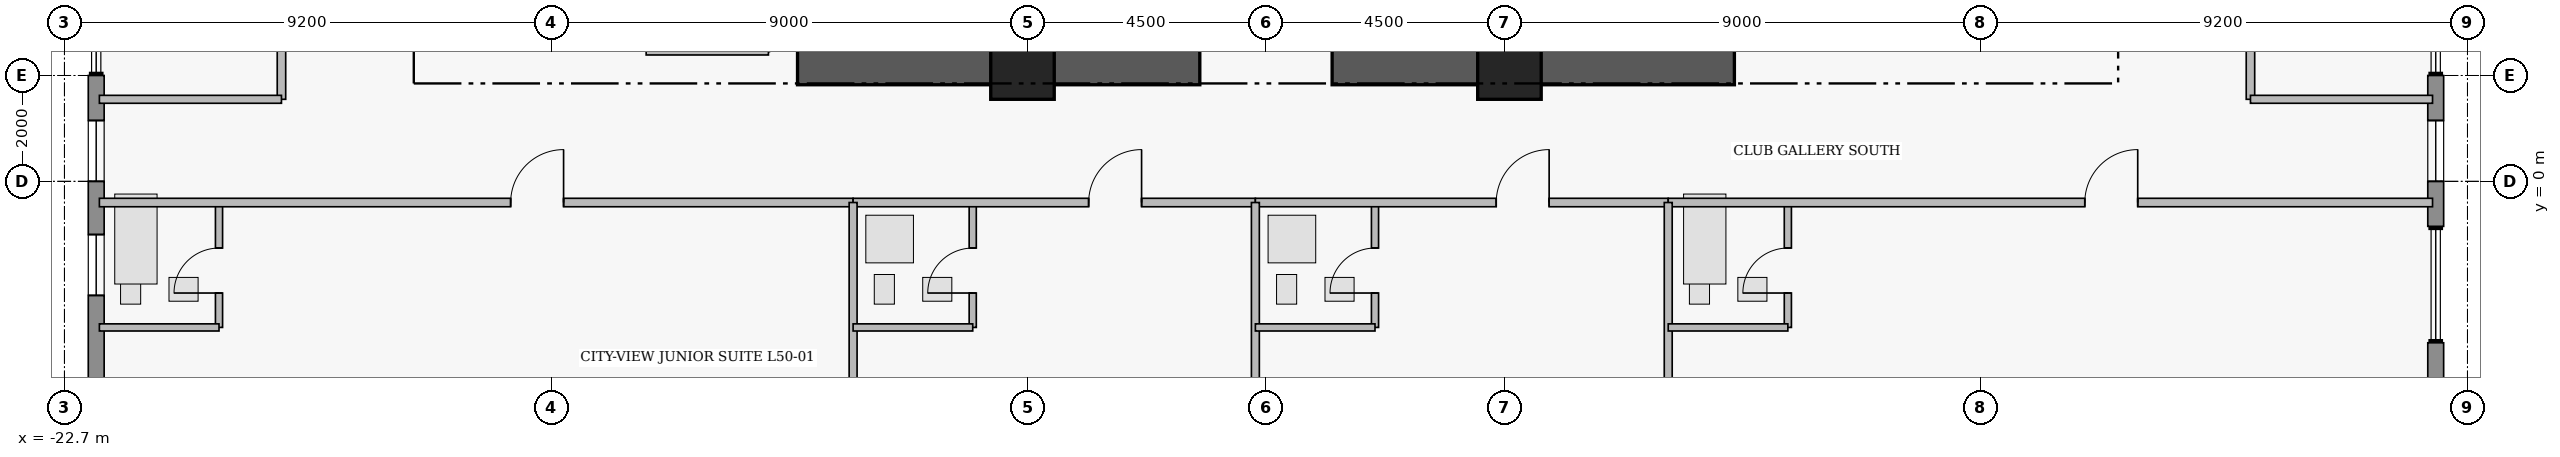
"""IFC4 building model, lengths in metres.
Left out: names, types, materials, properties, quantities, classifications, styles, units other than length and angle.
Written with IfcOpenShell. Run it as: python <this file> out.ifc"""

import sys

from ifc_helpers import new_model, si_unit, direction, frame, frame_2d, origin, origin_2d, place, context, subcontext, project, spatial, rectangle, extrude, element, fill, save


model = new_model("IFC4")
c1 = context("Model", 3, precision=1e-05, world=origin(), true_north=direction((0.0, 1.0)))
c2 = subcontext(c1, "Body", "Model", "MODEL_VIEW")
j1 = project(units=[si_unit("LENGTHUNIT", "METRE"), si_unit("PLANEANGLEUNIT", "RADIAN")], contexts=[c1])
p1 = place(None, origin())
s1 = spatial("IfcSite", under=j1, at=p1, CompositionType="ELEMENT")
p2 = place(p1, origin())
s2 = spatial("IfcBuilding", under=s1, at=p2, CompositionType="ELEMENT")
p3 = place(p2, frame((0.0, 0.0, 199.9)))
s3 = spatial("IfcBuildingStorey", under=s2, at=p3, CompositionType="ELEMENT", Elevation=199.9)
for number, where, z_axis, x_axis in (
    (1, (-8.85, 2.15, 0.0), (0.0, 0.0, 1.0), (1.0, 0.0, 0.0)),
    (2, (1.25, 2.15, 0.0), (0.0, 0.0, 1.0), (1.0, 0.0, 0.0)),
):
    element("IfcWall", number, at=place(p3, frame(where, z_axis=z_axis, x_axis=x_axis)), inside=s3, PredefinedType="SHEAR", context=c2, shape_type="SweptSolid", body=[
        extrude(rectangle(XDim=7.6, YDim=0.65, at=frame_2d((3.8, 0.0))), origin(), (0.0, 0.0, 1.0), 3.53),
    ])
for number, where, z_axis, x_axis in (
    (3, (-4.6, 2.15, 0.0), (0.0, 0.0, 1.0), (1.0, 0.0, 0.0)),
    (4, (4.6, 2.15, 0.0), (0.0, 0.0, 1.0), (1.0, 0.0, 0.0)),
):
    element("IfcColumn", number, at=place(p3, frame(where, z_axis=z_axis, x_axis=x_axis)), inside=s3, PredefinedType="COLUMN", context=c2, shape_type="SweptSolid", body=[
        extrude(rectangle(XDim=1.2, YDim=1.2, at=origin_2d()), origin(), (0.0, 0.0, 1.0), 3.75),
    ])
p4 = place(p3, frame((-22.1, -4.2, 0.0), z_axis=(0.0, 0.0, 1.0), x_axis=(0.0, 1.0, 0.0)))
e5 = element("IfcWall", 5, at=p4, inside=s3, PredefinedType="STANDARD", context=c2, shape_type="SweptSolid", body=[
    extrude(rectangle(XDim=6.2, YDim=0.3, at=frame_2d((3.1, 0.0))), origin(), (0.0, 0.0, 1.0), 3.53),
])
p5 = place(p4, frame((2.045, 0.0, 0.95)))
e6 = element("IfcOpeningElement", 6, at=p5, cuts=e5, PredefinedType="OPENING", context=c2, shape_type="SweptSolid", body=[
    extrude(rectangle(XDim=1.15, YDim=1.55, at=frame_2d((0.575, 0.775))), frame((0.0, 0.16, 0.0), z_axis=(0.0, -1.0, 0.0), x_axis=(1.0, 0.0, 0.0)), (0.0, 0.0, 1.0), 0.32),
])
p6 = place(p4, frame((4.2, 0.0, 0.95)))
e7 = element("IfcOpeningElement", 7, at=p6, cuts=e5, PredefinedType="OPENING", context=c2, shape_type="SweptSolid", body=[
    extrude(rectangle(XDim=1.15, YDim=1.55, at=frame_2d((0.575, 0.775))), frame((0.0, 0.16, 0.0), z_axis=(0.0, -1.0, 0.0), x_axis=(1.0, 0.0, 0.0)), (0.0, 0.0, 1.0), 0.32),
])
p7 = place(p3, frame((22.1, 2.0, 0.0), z_axis=(0.0, 0.0, 1.0), x_axis=(0.0, -1.0, 0.0)))
e8 = element("IfcWall", 8, at=p7, inside=s3, PredefinedType="STANDARD", context=c2, shape_type="SweptSolid", body=[
    extrude(rectangle(XDim=2.85, YDim=0.3, at=frame_2d((1.425, 0.0))), origin(), (0.0, 0.0, 1.0), 3.53),
])
p8 = place(p7, frame((0.85, 0.0, 0.95)))
e9 = element("IfcOpeningElement", 9, at=p8, cuts=e8, PredefinedType="OPENING", context=c2, shape_type="SweptSolid", body=[
    extrude(rectangle(XDim=1.15, YDim=1.55, at=frame_2d((0.575, 0.775))), frame((0.0, 0.16, 0.0), z_axis=(0.0, -1.0, 0.0), x_axis=(1.0, 0.0, 0.0)), (0.0, 0.0, 1.0), 0.32),
])
p9 = place(p3, frame((22.1, -3.05, 0.0), z_axis=(0.0, 0.0, 1.0), x_axis=(0.0, -1.0, 0.0)))
e10 = element("IfcWall", 10, at=p9, inside=s3, PredefinedType="STANDARD", context=c2, shape_type="SweptSolid", body=[
    extrude(rectangle(XDim=1.15, YDim=0.3, at=frame_2d((0.575, 0.0))), origin(), (0.0, 0.0, 1.0), 3.53),
])
p10 = place(p3, frame((-19.78, -2.76, 0.0), z_axis=(0.0, 0.0, 1.0), x_axis=(0.0, 1.0, 0.0)))
e11 = element("IfcWall", 11, at=p10, inside=s3, PredefinedType="PLUMBINGWALL", context=c2, shape_type="SweptSolid", body=[
    extrude(rectangle(XDim=2.36, YDim=0.135, at=frame_2d((1.18, 0.0))), origin(), (0.0, 0.0, 1.0), 3.53),
])
p11 = place(p10, frame((0.65, 0.0, 0.0)))
e12 = element("IfcOpeningElement", 12, at=p11, cuts=e11, PredefinedType="OPENING", context=c2, shape_type="SweptSolid", body=[
    extrude(rectangle(XDim=0.85, YDim=2.1, at=frame_2d((0.425, 1.05))), frame((0.0, 0.077, 0.0), z_axis=(0.0, -1.0, 0.0), x_axis=(1.0, 0.0, 0.0)), (0.0, 0.0, 1.0), 0.155),
])
p12 = place(p3, frame((-22.04, -0.4, 0.0), z_axis=(0.0, 0.0, 1.0), x_axis=(1.0, 0.0, 0.0)))
e13 = element("IfcWall", 13, at=p12, inside=s3, PredefinedType="PARTITIONING", context=c2, shape_type="SweptSolid", body=[
    extrude(rectangle(XDim=14.24, YDim=0.16, at=frame_2d((7.12, 0.0))), origin(), (0.0, 0.0, 1.0), 3.53),
])
p13 = place(p12, frame((7.77, 0.0, 0.0)))
e14 = element("IfcOpeningElement", 14, at=p13, cuts=e13, PredefinedType="OPENING", context=c2, shape_type="SweptSolid", body=[
    extrude(rectangle(XDim=1.0, YDim=2.15, at=frame_2d((0.5, 1.075))), frame((0.0, 0.09, 0.0), z_axis=(0.0, -1.0, 0.0), x_axis=(1.0, 0.0, 0.0)), (0.0, 0.0, 1.0), 0.18),
])
p14 = place(p3, frame((-5.54, -2.76, 0.0), z_axis=(0.0, 0.0, 1.0), x_axis=(0.0, 1.0, 0.0)))
e15 = element("IfcWall", 15, at=p14, inside=s3, PredefinedType="PLUMBINGWALL", context=c2, shape_type="SweptSolid", body=[
    extrude(rectangle(XDim=2.36, YDim=0.135, at=frame_2d((1.18, 0.0))), origin(), (0.0, 0.0, 1.0), 3.53),
])
p15 = place(p14, frame((0.65, 0.0, 0.0)))
e16 = element("IfcOpeningElement", 16, at=p15, cuts=e15, PredefinedType="OPENING", context=c2, shape_type="SweptSolid", body=[
    extrude(rectangle(XDim=0.85, YDim=2.1, at=frame_2d((0.425, 1.05))), frame((0.0, 0.077, 0.0), z_axis=(0.0, -1.0, 0.0), x_axis=(1.0, 0.0, 0.0)), (0.0, 0.0, 1.0), 0.155),
])
p16 = place(p3, frame((-7.8, -0.4, 0.0), z_axis=(0.0, 0.0, 1.0), x_axis=(1.0, 0.0, 0.0)))
e17 = element("IfcWall", 17, at=p16, inside=s3, PredefinedType="PARTITIONING", context=c2, shape_type="SweptSolid", body=[
    extrude(rectangle(XDim=7.6, YDim=0.16, at=frame_2d((3.8, 0.0))), origin(), (0.0, 0.0, 1.0), 3.53),
])
p17 = place(p16, frame((4.45, 0.0, 0.0)))
e18 = element("IfcOpeningElement", 18, at=p17, cuts=e17, PredefinedType="OPENING", context=c2, shape_type="SweptSolid", body=[
    extrude(rectangle(XDim=1.0, YDim=2.15, at=frame_2d((0.5, 1.075))), frame((0.0, 0.09, 0.0), z_axis=(0.0, -1.0, 0.0), x_axis=(1.0, 0.0, 0.0)), (0.0, 0.0, 1.0), 0.18),
])
p18 = place(p3, frame((2.06, -2.76, 0.0), z_axis=(0.0, 0.0, 1.0), x_axis=(0.0, 1.0, 0.0)))
e19 = element("IfcWall", 19, at=p18, inside=s3, PredefinedType="PLUMBINGWALL", context=c2, shape_type="SweptSolid", body=[
    extrude(rectangle(XDim=2.36, YDim=0.135, at=frame_2d((1.18, 0.0))), origin(), (0.0, 0.0, 1.0), 3.53),
])
p19 = place(p18, frame((0.65, 0.0, 0.0)))
e20 = element("IfcOpeningElement", 20, at=p19, cuts=e19, PredefinedType="OPENING", context=c2, shape_type="SweptSolid", body=[
    extrude(rectangle(XDim=0.85, YDim=2.1, at=frame_2d((0.425, 1.05))), frame((0.0, 0.077, 0.0), z_axis=(0.0, -1.0, 0.0), x_axis=(1.0, 0.0, 0.0)), (0.0, 0.0, 1.0), 0.155),
])
p20 = place(p3, frame((-0.2, -0.4, 0.0), z_axis=(0.0, 0.0, 1.0), x_axis=(1.0, 0.0, 0.0)))
e21 = element("IfcWall", 21, at=p20, inside=s3, PredefinedType="PARTITIONING", context=c2, shape_type="SweptSolid", body=[
    extrude(rectangle(XDim=7.8, YDim=0.16, at=frame_2d((3.9, 0.0))), origin(), (0.0, 0.0, 1.0), 3.53),
])
p21 = place(p20, frame((4.55, 0.0, 0.0)))
e22 = element("IfcOpeningElement", 22, at=p21, cuts=e21, PredefinedType="OPENING", context=c2, shape_type="SweptSolid", body=[
    extrude(rectangle(XDim=1.0, YDim=2.15, at=frame_2d((0.5, 1.075))), frame((0.0, 0.09, 0.0), z_axis=(0.0, -1.0, 0.0), x_axis=(1.0, 0.0, 0.0)), (0.0, 0.0, 1.0), 0.18),
])
p22 = place(p3, frame((9.86, -2.76, 0.0), z_axis=(0.0, 0.0, 1.0), x_axis=(0.0, 1.0, 0.0)))
e23 = element("IfcWall", 23, at=p22, inside=s3, PredefinedType="PLUMBINGWALL", context=c2, shape_type="SweptSolid", body=[
    extrude(rectangle(XDim=2.36, YDim=0.135, at=frame_2d((1.18, 0.0))), origin(), (0.0, 0.0, 1.0), 3.53),
])
p23 = place(p22, frame((0.65, 0.0, 0.0)))
e24 = element("IfcOpeningElement", 24, at=p23, cuts=e23, PredefinedType="OPENING", context=c2, shape_type="SweptSolid", body=[
    extrude(rectangle(XDim=0.85, YDim=2.1, at=frame_2d((0.425, 1.05))), frame((0.0, 0.077, 0.0), z_axis=(0.0, -1.0, 0.0), x_axis=(1.0, 0.0, 0.0)), (0.0, 0.0, 1.0), 0.155),
])
p24 = place(p3, frame((7.6, -0.4, 0.0), z_axis=(0.0, 0.0, 1.0), x_axis=(1.0, 0.0, 0.0)))
e25 = element("IfcWall", 25, at=p24, inside=s3, PredefinedType="PARTITIONING", context=c2, shape_type="SweptSolid", body=[
    extrude(rectangle(XDim=14.44, YDim=0.16, at=frame_2d((7.22, 0.0))), origin(), (0.0, 0.0, 1.0), 3.53),
])
p25 = place(p24, frame((7.87, 0.0, 0.0)))
e26 = element("IfcOpeningElement", 26, at=p25, cuts=e25, PredefinedType="OPENING", context=c2, shape_type="SweptSolid", body=[
    extrude(rectangle(XDim=1.0, YDim=2.15, at=frame_2d((0.5, 1.075))), frame((0.0, 0.09, 0.0), z_axis=(0.0, -1.0, 0.0), x_axis=(1.0, 0.0, 0.0)), (0.0, 0.0, 1.0), 0.18),
])
p26 = place(p3, frame((18.6, 1.55, 0.0), z_axis=(0.0, 0.0, 1.0), x_axis=(0.0, 1.0, 0.0)))
e27 = element("IfcWall", 27, at=p26, inside=s3, PredefinedType="PARTITIONING", context=c2, shape_type="SweptSolid", body=[
    extrude(rectangle(XDim=5.2, YDim=0.16, at=frame_2d((2.6, 0.0))), origin(), (0.0, 0.0, 1.0), 3.53),
])
p27 = place(p26, frame((2.14, 0.0, 0.0)))
e28 = element("IfcOpeningElement", 28, at=p27, cuts=e27, PredefinedType="OPENING", context=c2, shape_type="SweptSolid", body=[
    extrude(rectangle(XDim=0.92, YDim=2.12, at=frame_2d((0.46, 1.06))), frame((0.0, 0.09, 0.0), z_axis=(0.0, -1.0, 0.0), x_axis=(1.0, 0.0, 0.0)), (0.0, 0.0, 1.0), 0.18),
])
p28 = place(p3, frame((-18.6, 1.55, 0.0), z_axis=(0.0, 0.0, 1.0), x_axis=(0.0, 1.0, 0.0)))
e29 = element("IfcWall", 29, at=p28, inside=s3, PredefinedType="PARTITIONING", context=c2, shape_type="SweptSolid", body=[
    extrude(rectangle(XDim=6.35, YDim=0.16, at=frame_2d((3.175, 0.0))), origin(), (0.0, 0.0, 1.0), 3.53),
])
p29 = place(p28, frame((2.7, 0.0, 0.0)))
e30 = element("IfcOpeningElement", 30, at=p29, cuts=e29, PredefinedType="OPENING", context=c2, shape_type="SweptSolid", body=[
    extrude(rectangle(XDim=0.95, YDim=2.15, at=frame_2d((0.475, 1.075))), frame((0.0, 0.09, 0.0), z_axis=(0.0, -1.0, 0.0), x_axis=(1.0, 0.0, 0.0)), (0.0, 0.0, 1.0), 0.18),
])
p30 = place(p3, frame((-11.71, 2.47, 0.0), z_axis=(0.0, 0.0, 1.0), x_axis=(1.0, 0.0, 0.0)))
e31 = element("IfcWall", 31, at=p30, inside=s3, PredefinedType="PARTITIONING", context=c2, shape_type="SweptSolid", body=[
    extrude(rectangle(XDim=2.31, YDim=0.165, at=frame_2d((1.155, 0.0))), origin(), (0.0, 0.0, 1.0), 2.43),
])
p31 = place(p3, frame((-22.04, -2.76, 0.0), z_axis=(0.0, 0.0, 1.0), x_axis=(1.0, 0.0, 0.0)))
e32 = element("IfcWall", 32, at=p31, inside=s3, PredefinedType="PLUMBINGWALL", context=c2, shape_type="SweptSolid", body=[
    extrude(rectangle(XDim=2.26, YDim=0.135, at=frame_2d((1.13, 0.0))), origin(), (0.0, 0.0, 1.0), 3.53),
])
p32 = place(p3, frame((-7.8, -7.52, 0.0), z_axis=(0.0, 0.0, 1.0), x_axis=(0.0, 1.0, 0.0)))
e33 = element("IfcWall", 33, at=p32, inside=s3, PredefinedType="PARTITIONING", context=c2, shape_type="SweptSolid", body=[
    extrude(rectangle(XDim=7.12, YDim=0.15, at=frame_2d((3.56, 0.0))), origin(), (0.0, 0.0, 1.0), 3.53),
])
p33 = place(p3, frame((-7.8, -2.76, 0.0), z_axis=(0.0, 0.0, 1.0), x_axis=(1.0, 0.0, 0.0)))
e34 = element("IfcWall", 34, at=p33, inside=s3, PredefinedType="PLUMBINGWALL", context=c2, shape_type="SweptSolid", body=[
    extrude(rectangle(XDim=2.26, YDim=0.135, at=frame_2d((1.13, 0.0))), origin(), (0.0, 0.0, 1.0), 3.124),
])
p34 = place(p3, frame((-0.2, -7.52, 0.0), z_axis=(0.0, 0.0, 1.0), x_axis=(0.0, 1.0, 0.0)))
e35 = element("IfcWall", 35, at=p34, inside=s3, PredefinedType="PARTITIONING", context=c2, shape_type="SweptSolid", body=[
    extrude(rectangle(XDim=7.12, YDim=0.15, at=frame_2d((3.56, 0.0))), origin(), (0.0, 0.0, 1.0), 3.53),
])
p35 = place(p3, frame((-0.2, -2.76, 0.0), z_axis=(0.0, 0.0, 1.0), x_axis=(1.0, 0.0, 0.0)))
e36 = element("IfcWall", 36, at=p35, inside=s3, PredefinedType="PLUMBINGWALL", context=c2, shape_type="SweptSolid", body=[
    extrude(rectangle(XDim=2.26, YDim=0.135, at=frame_2d((1.13, 0.0))), origin(), (0.0, 0.0, 1.0), 3.124),
])
p36 = place(p3, frame((7.6, -7.52, 0.0), z_axis=(0.0, 0.0, 1.0), x_axis=(0.0, 1.0, 0.0)))
e37 = element("IfcWall", 37, at=p36, inside=s3, PredefinedType="PARTITIONING", context=c2, shape_type="SweptSolid", body=[
    extrude(rectangle(XDim=7.12, YDim=0.15, at=frame_2d((3.56, 0.0))), origin(), (0.0, 0.0, 1.0), 3.53),
])
p37 = place(p3, frame((7.6, -2.76, 0.0), z_axis=(0.0, 0.0, 1.0), x_axis=(1.0, 0.0, 0.0)))
e38 = element("IfcWall", 38, at=p37, inside=s3, PredefinedType="PLUMBINGWALL", context=c2, shape_type="SweptSolid", body=[
    extrude(rectangle(XDim=2.26, YDim=0.135, at=frame_2d((1.13, 0.0))), origin(), (0.0, 0.0, 1.0), 3.124),
])
for number, where, z_axis, x_axis in (
    (39, (18.6, 1.55, 0.0), (0.0, 0.0, 1.0), (1.0, 0.0, 0.0)),
    (40, (-22.04, 1.55, 0.0), (0.0, 0.0, 1.0), (1.0, 0.0, 0.0)),
):
    element("IfcWall", number, at=place(p3, frame(where, z_axis=z_axis, x_axis=x_axis)), inside=s3, PredefinedType="PARTITIONING", context=c2, shape_type="SweptSolid", body=[
        extrude(rectangle(XDim=3.44, YDim=0.15, at=frame_2d((1.72, 0.0))), origin(), (0.0, 0.0, 1.0), 3.53),
    ])
p38 = place(p5, origin())
e41 = element("IfcWindow", 41, at=p38, inside=s3, PartitioningType="SINGLE_PANEL", PredefinedType="WINDOW", context=c2, shape_type="SweptSolid", body=[
    extrude(rectangle(XDim=1.15, YDim=1.55, at=frame_2d((0.575, 0.775))), frame((0.0, 0.03, 0.0), z_axis=(0.0, -1.0, 0.0), x_axis=(1.0, 0.0, 0.0)), (0.0, 0.0, 1.0), 0.06),
])
fill(e6, e41)
p39 = place(p6, origin())
e42 = element("IfcWindow", 42, at=p39, inside=s3, PartitioningType="SINGLE_PANEL", PredefinedType="WINDOW", context=c2, shape_type="SweptSolid", body=[
    extrude(rectangle(XDim=1.15, YDim=1.55, at=frame_2d((0.575, 0.775))), frame((0.0, 0.03, 0.0), z_axis=(0.0, -1.0, 0.0), x_axis=(1.0, 0.0, 0.0)), (0.0, 0.0, 1.0), 0.06),
])
fill(e7, e42)
p40 = place(p8, origin())
e43 = element("IfcWindow", 43, at=p40, inside=s3, PartitioningType="SINGLE_PANEL", PredefinedType="WINDOW", context=c2, shape_type="SweptSolid", body=[
    extrude(rectangle(XDim=1.15, YDim=1.55, at=frame_2d((0.575, 0.775))), frame((0.0, 0.03, 0.0), z_axis=(0.0, -1.0, 0.0), x_axis=(1.0, 0.0, 0.0)), (0.0, 0.0, 1.0), 0.06),
])
fill(e9, e43)
p41 = place(p11, origin())
e44 = element("IfcDoor", 44, at=p41, inside=s3, OperationType="SINGLE_SWING_LEFT", PredefinedType="DOOR", context=c2, shape_type="SweptSolid", body=[
    extrude(rectangle(XDim=0.85, YDim=2.1, at=frame_2d((0.425, 1.05))), frame((0.0, 0.025, 0.0), z_axis=(0.0, -1.0, 0.0), x_axis=(1.0, 0.0, 0.0)), (0.0, 0.0, 1.0), 0.05),
])
fill(e12, e44)
p42 = place(p13, origin())
e45 = element("IfcDoor", 45, at=p42, inside=s3, OperationType="SINGLE_SWING_RIGHT", PredefinedType="DOOR", context=c2, shape_type="SweptSolid", body=[
    extrude(rectangle(XDim=1.0, YDim=2.15, at=frame_2d((0.5, 1.075))), frame((0.0, 0.025, 0.0), z_axis=(0.0, -1.0, 0.0), x_axis=(1.0, 0.0, 0.0)), (0.0, 0.0, 1.0), 0.05),
])
fill(e14, e45)
p43 = place(p15, origin())
e46 = element("IfcDoor", 46, at=p43, inside=s3, OperationType="SINGLE_SWING_LEFT", PredefinedType="DOOR", context=c2, shape_type="SweptSolid", body=[
    extrude(rectangle(XDim=0.85, YDim=2.1, at=frame_2d((0.425, 1.05))), frame((0.0, 0.025, 0.0), z_axis=(0.0, -1.0, 0.0), x_axis=(1.0, 0.0, 0.0)), (0.0, 0.0, 1.0), 0.05),
])
fill(e16, e46)
p44 = place(p17, origin())
e47 = element("IfcDoor", 47, at=p44, inside=s3, OperationType="SINGLE_SWING_RIGHT", PredefinedType="DOOR", context=c2, shape_type="SweptSolid", body=[
    extrude(rectangle(XDim=1.0, YDim=2.15, at=frame_2d((0.5, 1.075))), frame((0.0, 0.025, 0.0), z_axis=(0.0, -1.0, 0.0), x_axis=(1.0, 0.0, 0.0)), (0.0, 0.0, 1.0), 0.05),
])
fill(e18, e47)
p45 = place(p19, origin())
e48 = element("IfcDoor", 48, at=p45, inside=s3, OperationType="SINGLE_SWING_LEFT", PredefinedType="DOOR", context=c2, shape_type="SweptSolid", body=[
    extrude(rectangle(XDim=0.85, YDim=2.1, at=frame_2d((0.425, 1.05))), frame((0.0, 0.025, 0.0), z_axis=(0.0, -1.0, 0.0), x_axis=(1.0, 0.0, 0.0)), (0.0, 0.0, 1.0), 0.05),
])
fill(e20, e48)
p46 = place(p21, origin())
e49 = element("IfcDoor", 49, at=p46, inside=s3, OperationType="SINGLE_SWING_RIGHT", PredefinedType="DOOR", context=c2, shape_type="SweptSolid", body=[
    extrude(rectangle(XDim=1.0, YDim=2.15, at=frame_2d((0.5, 1.075))), frame((0.0, 0.025, 0.0), z_axis=(0.0, -1.0, 0.0), x_axis=(1.0, 0.0, 0.0)), (0.0, 0.0, 1.0), 0.05),
])
fill(e22, e49)
p47 = place(p23, origin())
e50 = element("IfcDoor", 50, at=p47, inside=s3, OperationType="SINGLE_SWING_LEFT", PredefinedType="DOOR", context=c2, shape_type="SweptSolid", body=[
    extrude(rectangle(XDim=0.85, YDim=2.1, at=frame_2d((0.425, 1.05))), frame((0.0, 0.025, 0.0), z_axis=(0.0, -1.0, 0.0), x_axis=(1.0, 0.0, 0.0)), (0.0, 0.0, 1.0), 0.05),
])
fill(e24, e50)
p48 = place(p25, origin())
e51 = element("IfcDoor", 51, at=p48, inside=s3, OperationType="SINGLE_SWING_RIGHT", PredefinedType="DOOR", context=c2, shape_type="SweptSolid", body=[
    extrude(rectangle(XDim=1.0, YDim=2.15, at=frame_2d((0.5, 1.075))), frame((0.0, 0.025, 0.0), z_axis=(0.0, -1.0, 0.0), x_axis=(1.0, 0.0, 0.0)), (0.0, 0.0, 1.0), 0.05),
])
fill(e26, e51)
save(model, sys.argv[1])
